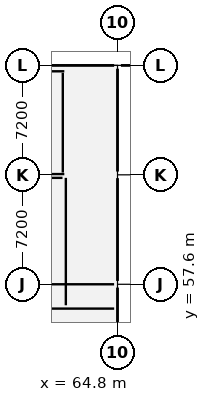
"""IFC4 building model, lengths in metres.
Left out: names, types, materials, properties, quantities, classifications, styles, units other than length and angle.
Written with IfcOpenShell. Run it as: python <this file> out.ifc"""

import sys

from ifc_helpers import new_model, si_unit, direction, frame, frame_2d, origin, origin_2d, place, context, subcontext, project, spatial, rectangle, extrude, element, fill, save


model = new_model("IFC4")
c1 = context("Model", 3, precision=1e-05, world=origin(), true_north=direction((0.0, 1.0)))
c2 = subcontext(c1, "Body", "Model", "MODEL_VIEW")
j1 = project(units=[si_unit("LENGTHUNIT", "METRE"), si_unit("PLANEANGLEUNIT", "RADIAN")], contexts=[c1])
p1 = place(None, origin())
s1 = spatial("IfcSite", under=j1, at=p1, CompositionType="ELEMENT")
p2 = place(p1, origin())
s2 = spatial("IfcBuilding", under=s1, at=p2, CompositionType="ELEMENT")
p3 = place(p2, frame((0.0, 0.0, 5.4)))
s3 = spatial("IfcBuildingStorey", under=s2, at=p3, CompositionType="ELEMENT", Elevation=5.4)
for number, where, z_axis, x_axis in (
    (1, (64.8, 57.6, 0.0), (0.0, 0.0, 1.0), (1.0, 0.0, 0.0)),
    (2, (64.8, 64.8, 0.0), (0.0, 0.0, 1.0), (1.0, 0.0, 0.0)),
    (3, (64.8, 72.0, 0.0), (0.0, 0.0, 1.0), (1.0, 0.0, 0.0)),
):
    element("IfcColumn", number, at=place(p3, frame(where, z_axis=z_axis, x_axis=x_axis)), inside=s3, PredefinedType="COLUMN", context=c2, shape_type="SweptSolid", body=[
        extrude(rectangle(XDim=0.45, YDim=0.45, at=origin_2d()), origin(), (0.0, 0.0, 1.0), 4.2),
    ])
p4 = place(p3, frame((57.825, 64.85, 0.0), z_axis=(0.0, 0.0, 1.0), x_axis=(1.0, 0.0, 0.0)))
e4 = element("IfcWall", 4, at=p4, inside=s3, PredefinedType="SHEAR", context=c2, shape_type="SweptSolid", body=[
    extrude(rectangle(XDim=3.475, YDim=0.2, at=frame_2d((1.738, 0.0))), origin(), (0.0, 0.0, 1.0), 3.95),
])
p5 = place(p3, frame((58.11, 71.61, 0.0), z_axis=(0.0, 0.0, 1.0), x_axis=(1.0, 0.0, 0.0)))
e5 = element("IfcWall", 5, at=p5, inside=s3, PredefinedType="SHEAR", context=c2, shape_type="SweptSolid", body=[
    extrude(rectangle(XDim=3.19, YDim=0.2, at=frame_2d((1.595, 0.0))), origin(), (0.0, 0.0, 1.0), 3.95),
])
p6 = place(p3, frame((61.2, 64.95, 0.0), z_axis=(0.0, 0.0, 1.0), x_axis=(0.0, 1.0, 0.0)))
e6 = element("IfcWall", 6, at=p6, inside=s3, PredefinedType="SHEAR", context=c2, shape_type="SweptSolid", body=[
    extrude(rectangle(XDim=6.56, YDim=0.2, at=frame_2d((3.28, 0.0))), origin(), (0.0, 0.0, 1.0), 3.95),
])
p7 = place(p6, frame((0.14, 0.0, 0.0)))
e7 = element("IfcOpeningElement", 7, at=p7, cuts=e6, PredefinedType="OPENING", context=c2, shape_type="SweptSolid", body=[
    extrude(rectangle(XDim=1.1, YDim=2.15, at=frame_2d((0.55, 1.075))), frame((0.0, 0.112, 0.0), z_axis=(0.0, -1.0, 0.0), x_axis=(1.0, 0.0, 0.0)), (0.0, 0.0, 1.0), 0.224),
])
p8 = place(p3, frame((61.0, 72.0, 0.0), z_axis=(0.0, 0.0, 1.0), x_axis=(1.0, 0.0, 0.0)))
e8 = element("IfcWall", 8, at=p8, inside=s3, PredefinedType="SOLIDWALL", context=c2, shape_type="SweptSolid", body=[
    extrude(rectangle(XDim=0.4, YDim=0.36, at=frame_2d((0.2, 0.0))), origin(), (0.0, 0.0, 1.0), 3.721),
])
p9 = place(p3, frame((64.8, 71.775, 0.0), z_axis=(0.0, 0.0, 1.0), x_axis=(0.0, -1.0, 0.0)))
e9 = element("IfcWall", 9, at=p9, inside=s3, PredefinedType="ELEMENTEDWALL", context=c2, shape_type="SweptSolid", body=[
    extrude(rectangle(XDim=6.75, YDim=0.32, at=frame_2d((3.375, 0.0))), origin(), (0.0, 0.0, 1.0), 3.773),
])
p10 = place(p9, frame((2.475, 0.0, 0.85)))
e10 = element("IfcOpeningElement", 10, at=p10, cuts=e9, PredefinedType="OPENING", context=c2, shape_type="SweptSolid", body=[
    extrude(rectangle(XDim=1.8, YDim=2.2, at=frame_2d((0.9, 1.1))), frame((0.0, 0.172, 0.0), z_axis=(0.0, -1.0, 0.0), x_axis=(1.0, 0.0, 0.0)), (0.0, 0.0, 1.0), 0.344),
])
p11 = place(p3, frame((64.8, 64.575, 0.0), z_axis=(0.0, 0.0, 1.0), x_axis=(0.0, -1.0, 0.0)))
e11 = element("IfcWall", 11, at=p11, inside=s3, PredefinedType="ELEMENTEDWALL", context=c2, shape_type="SweptSolid", body=[
    extrude(rectangle(XDim=6.75, YDim=0.32, at=frame_2d((3.375, 0.0))), origin(), (0.0, 0.0, 1.0), 3.773),
])
p12 = place(p11, frame((2.925, 0.0, 0.85)))
e12 = element("IfcOpeningElement", 12, at=p12, cuts=e11, PredefinedType="OPENING", context=c2, shape_type="SweptSolid", body=[
    extrude(rectangle(XDim=0.9, YDim=2.0, at=frame_2d((0.45, 1.0))), frame((0.0, 0.172, 0.0), z_axis=(0.0, -1.0, 0.0), x_axis=(1.0, 0.0, 0.0)), (0.0, 0.0, 1.0), 0.344),
])
p13 = place(p3, frame((64.8, 57.375, 0.0), z_axis=(0.0, 0.0, 1.0), x_axis=(0.0, -1.0, 0.0)))
e13 = element("IfcWall", 13, at=p13, inside=s3, PredefinedType="ELEMENTEDWALL", context=c2, shape_type="SweptSolid", body=[
    extrude(rectangle(XDim=6.75, YDim=0.32, at=frame_2d((3.375, 0.0))), origin(), (0.0, 0.0, 1.0), 3.773),
])
p14 = place(p13, frame((2.7, 0.0, 0.85)))
e14 = element("IfcOpeningElement", 14, at=p14, cuts=e13, PredefinedType="OPENING", context=c2, shape_type="SweptSolid", body=[
    extrude(rectangle(XDim=1.35, YDim=2.0, at=frame_2d((0.675, 1.0))), frame((0.0, 0.172, 0.0), z_axis=(0.0, -1.0, 0.0), x_axis=(1.0, 0.0, 0.0)), (0.0, 0.0, 1.0), 0.344),
])
p15 = place(p3, frame((57.82, 56.0, 0.0), z_axis=(0.0, 0.0, 1.0), x_axis=(1.0, 0.0, 0.0)))
e15 = element("IfcWall", 15, at=p15, inside=s3, PredefinedType="PARTITIONING", context=c2, shape_type="SweptSolid", body=[
    extrude(rectangle(XDim=6.76, YDim=0.1, at=frame_2d((3.38, 0.0))), origin(), (0.0, 0.0, 1.0), 3.92),
])
p16 = place(p15, frame((2.88, 0.0, 0.0)))
e16 = element("IfcOpeningElement", 16, at=p16, cuts=e15, PredefinedType="OPENING", context=c2, shape_type="SweptSolid", body=[
    extrude(rectangle(XDim=1.0, YDim=2.15, at=frame_2d((0.5, 1.075))), frame((0.0, 0.062, 0.0), z_axis=(0.0, -1.0, 0.0), x_axis=(1.0, 0.0, 0.0)), (0.0, 0.0, 1.0), 0.124),
])
p17 = place(p3, frame((61.4, 56.22, 0.0), z_axis=(0.0, 0.0, 1.0), x_axis=(0.0, 1.0, 0.0)))
e17 = element("IfcWall", 17, at=p17, inside=s3, PredefinedType="PARTITIONING", context=c2, shape_type="SweptSolid", body=[
    extrude(rectangle(XDim=8.38, YDim=0.12, at=frame_2d((4.19, 0.0))), origin(), (0.0, 0.0, 1.0), 3.773),
])
p18 = place(p17, frame((3.69, 0.0, 0.0)))
e18 = element("IfcOpeningElement", 18, at=p18, cuts=e17, PredefinedType="OPENING", context=c2, shape_type="SweptSolid", body=[
    extrude(rectangle(XDim=1.0, YDim=2.15, at=frame_2d((0.5, 1.075))), frame((0.0, 0.072, 0.0), z_axis=(0.0, -1.0, 0.0), x_axis=(1.0, 0.0, 0.0)), (0.0, 0.0, 1.0), 0.144),
])
p19 = place(p3, frame((57.865, 64.6, 0.0), z_axis=(0.0, 0.0, 1.0), x_axis=(1.0, 0.0, 0.0)))
e19 = element("IfcWall", 19, at=p19, inside=s3, PredefinedType="PARTITIONING", context=c2, shape_type="SweptSolid", body=[
    extrude(rectangle(XDim=3.315, YDim=0.12, at=frame_2d((1.657, 0.0))), origin(), (0.0, 0.0, 1.0), 3.92),
])
p20 = place(p10, origin())
e20 = element("IfcWindow", 20, at=p20, inside=s3, PartitioningType="SINGLE_PANEL", PredefinedType="WINDOW", context=c2, shape_type="SweptSolid", body=[
    extrude(rectangle(XDim=1.8, YDim=2.2, at=frame_2d((0.9, 1.1))), frame((0.0, 0.03, 0.0), z_axis=(0.0, -1.0, 0.0), x_axis=(1.0, 0.0, 0.0)), (0.0, 0.0, 1.0), 0.06),
])
fill(e10, e20)
p21 = place(p12, origin())
e21 = element("IfcWindow", 21, at=p21, inside=s3, PartitioningType="SINGLE_PANEL", PredefinedType="WINDOW", context=c2, shape_type="SweptSolid", body=[
    extrude(rectangle(XDim=0.9, YDim=2.0, at=frame_2d((0.45, 1.0))), frame((0.0, 0.03, 0.0), z_axis=(0.0, -1.0, 0.0), x_axis=(1.0, 0.0, 0.0)), (0.0, 0.0, 1.0), 0.06),
])
fill(e12, e21)
p22 = place(p7, origin())
e22 = element("IfcDoor", 22, at=p22, inside=s3, OperationType="SINGLE_SWING_RIGHT", PredefinedType="DOOR", context=c2, shape_type="SweptSolid", body=[
    extrude(rectangle(XDim=1.1, YDim=2.15, at=frame_2d((0.55, 1.075))), frame((0.0, 0.025, 0.0), z_axis=(0.0, -1.0, 0.0), x_axis=(1.0, 0.0, 0.0)), (0.0, 0.0, 1.0), 0.05),
])
fill(e7, e22)
p23 = place(p16, origin())
e23 = element("IfcDoor", 23, at=p23, inside=s3, OperationType="SINGLE_SWING_LEFT", PredefinedType="DOOR", context=c2, shape_type="SweptSolid", body=[
    extrude(rectangle(XDim=1.0, YDim=2.15, at=frame_2d((0.5, 1.075))), frame((0.0, 0.025, 0.0), z_axis=(0.0, -1.0, 0.0), x_axis=(1.0, 0.0, 0.0)), (0.0, 0.0, 1.0), 0.05),
])
fill(e16, e23)
p24 = place(p18, origin())
e24 = element("IfcDoor", 24, at=p24, inside=s3, OperationType="SINGLE_SWING_RIGHT", PredefinedType="DOOR", context=c2, shape_type="SweptSolid", body=[
    extrude(rectangle(XDim=1.0, YDim=2.15, at=frame_2d((0.5, 1.075))), frame((0.0, 0.025, 0.0), z_axis=(0.0, -1.0, 0.0), x_axis=(1.0, 0.0, 0.0)), (0.0, 0.0, 1.0), 0.05),
])
fill(e18, e24)
save(model, sys.argv[1])
